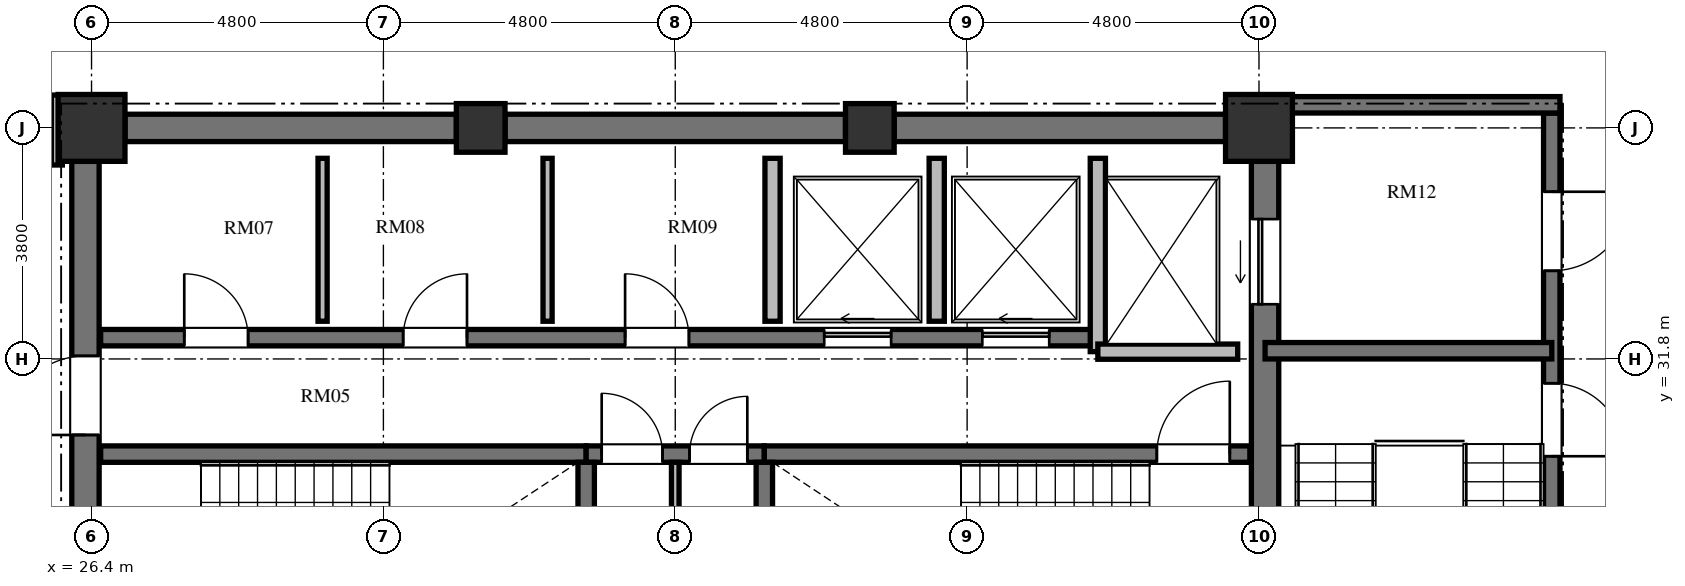
"""IFC4 building model, lengths in metres.
Left out: names, types, materials, properties, quantities, classifications, styles, units other than length and angle.
Written with IfcOpenShell. Run it as: python <this file> out.ifc"""

import sys

from ifc_helpers import new_model, si_unit, direction, frame, frame_2d, origin, origin_2d, place, context, subcontext, project, spatial, rectangle, extrude, element, fill, save


model = new_model("IFC4")
c1 = context("Model", 3, precision=1e-05, world=origin(), true_north=direction((0.0, 1.0)))
c2 = subcontext(c1, "Body", "Model", "MODEL_VIEW")
j1 = project(units=[si_unit("LENGTHUNIT", "METRE"), si_unit("PLANEANGLEUNIT", "RADIAN")], contexts=[c1])
p1 = place(None, origin())
s1 = spatial("IfcSite", under=j1, at=p1, CompositionType="ELEMENT")
p2 = place(p1, origin())
s2 = spatial("IfcBuilding", under=s1, at=p2, CompositionType="ELEMENT")
p3 = place(p2, frame((0.0, 0.0, 258.672)))
s3 = spatial("IfcBuildingStorey", under=s2, at=p3, CompositionType="ELEMENT", Elevation=258.672)
p4 = place(p3, frame((45.6, 35.6, 0.0), z_axis=(0.0, 0.0, 1.0), x_axis=(1.0, 0.0, 0.0)))
e1 = element("IfcColumn", 1, at=p4, inside=s3, PredefinedType="COLUMN", context=c2, shape_type="SweptSolid", body=[
    extrude(rectangle(XDim=1.1, YDim=1.1, at=origin_2d()), origin(), (0.0, 0.0, 1.0), 3.648),
])
for number, where, z_axis, x_axis in (
    (2, (39.2, 35.6, 0.0), (0.0, 0.0, 1.0), (1.0, 0.0, 0.0)),
    (3, (32.8, 35.6, 0.0), (0.0, 0.0, 1.0), (1.0, 0.0, 0.0)),
):
    element("IfcColumn", number, at=place(p3, frame(where, z_axis=z_axis, x_axis=x_axis)), inside=s3, PredefinedType="COLUMN", context=c2, shape_type="SweptSolid", body=[
        extrude(rectangle(XDim=0.8, YDim=0.8, at=origin_2d()), origin(), (0.0, 0.0, 1.0), 3.648),
    ])
p5 = place(p3, frame((26.4, 35.6, 0.0), z_axis=(0.0, 0.0, 1.0), x_axis=(1.0, 0.0, 0.0)))
e4 = element("IfcColumn", 4, at=p5, inside=s3, PredefinedType="COLUMN", context=c2, shape_type="SweptSolid", body=[
    extrude(rectangle(XDim=1.1, YDim=1.1, at=origin_2d()), origin(), (0.0, 0.0, 1.0), 3.648),
])
p6 = place(p3, frame((26.3, 20.95, 0.0), z_axis=(0.0, 0.0, 1.0), x_axis=(0.0, 1.0, 0.0)))
e5 = element("IfcWall", 5, at=p6, inside=s3, PredefinedType="SHEAR", context=c2, shape_type="SweptSolid", body=[
    extrude(rectangle(XDim=14.1, YDim=0.45, at=frame_2d((7.05, 0.0))), origin(), (0.0, 0.0, 1.0), 3.648),
])
p7 = place(p6, frame((6.5, 0.0, 0.0)))
e6 = element("IfcOpeningElement", 6, at=p7, cuts=e5, PredefinedType="OPENING", context=c2, shape_type="SweptSolid", body=[
    extrude(rectangle(XDim=1.2, YDim=2.15, at=frame_2d((0.6, 1.075))), frame((0.0, 0.235, 0.0), z_axis=(0.0, -1.0, 0.0), x_axis=(1.0, 0.0, 0.0)), (0.0, 0.0, 1.0), 0.47),
])
p8 = place(p6, frame((9.6, 0.0, 0.0)))
e7 = element("IfcOpeningElement", 7, at=p8, cuts=e5, PredefinedType="OPENING", context=c2, shape_type="SweptSolid", body=[
    extrude(rectangle(XDim=1.3, YDim=2.2, at=frame_2d((0.65, 1.1))), frame((0.0, 0.235, 0.0), z_axis=(0.0, -1.0, 0.0), x_axis=(1.0, 0.0, 0.0)), (0.0, 0.0, 1.0), 0.47),
])
p9 = place(p6, frame((3.26, 0.0, 0.0)))
e8 = element("IfcOpeningElement", 8, at=p9, cuts=e5, PredefinedType="OPENING", context=c2, shape_type="SweptSolid", body=[
    extrude(rectangle(XDim=1.3, YDim=2.2, at=frame_2d((0.65, 1.1))), frame((0.0, 0.235, 0.0), z_axis=(0.0, -1.0, 0.0), x_axis=(1.0, 0.0, 0.0)), (0.0, 0.0, 1.0), 0.47),
])
p10 = place(p3, frame((45.7, 20.95, 0.0), z_axis=(0.0, 0.0, 1.0), x_axis=(0.0, 1.0, 0.0)))
e9 = element("IfcWall", 9, at=p10, inside=s3, PredefinedType="SHEAR", context=c2, shape_type="SweptSolid", body=[
    extrude(rectangle(XDim=14.1, YDim=0.45, at=frame_2d((7.05, 0.0))), origin(), (0.0, 0.0, 1.0), 3.648),
])
p11 = place(p10, frame((11.75, 0.0, 0.0)))
e10 = element("IfcOpeningElement", 10, at=p11, cuts=e9, PredefinedType="OPENING", context=c2, shape_type="SweptSolid", body=[
    extrude(rectangle(XDim=1.4, YDim=2.3, at=frame_2d((0.7, 1.15))), frame((0.0, 0.235, 0.0), z_axis=(0.0, -1.0, 0.0), x_axis=(1.0, 0.0, 0.0)), (0.0, 0.0, 1.0), 0.47),
])
p12 = place(p10, frame((0.95, 0.0, 0.0)))
e11 = element("IfcOpeningElement", 11, at=p12, cuts=e9, PredefinedType="OPENING", context=c2, shape_type="SweptSolid", body=[
    extrude(rectangle(XDim=1.4, YDim=2.3, at=frame_2d((0.7, 1.15))), frame((0.0, 0.235, 0.0), z_axis=(0.0, -1.0, 0.0), x_axis=(1.0, 0.0, 0.0)), (0.0, 0.0, 1.0), 0.47),
])
p13 = place(p3, frame((26.95, 35.6, 0.0), z_axis=(0.0, 0.0, 1.0), x_axis=(1.0, 0.0, 0.0)))
e12 = element("IfcWall", 12, at=p13, inside=s3, PredefinedType="SHEAR", context=c2, shape_type="SweptSolid", body=[
    extrude(rectangle(XDim=5.45, YDim=0.45, at=frame_2d((2.725, 0.0))), origin(), (0.0, 0.0, 1.0), 3.648),
])
p14 = place(p3, frame((33.2, 35.6, 0.0), z_axis=(0.0, 0.0, 1.0), x_axis=(1.0, 0.0, 0.0)))
e13 = element("IfcWall", 13, at=p14, inside=s3, PredefinedType="SHEAR", context=c2, shape_type="SweptSolid", body=[
    extrude(rectangle(XDim=5.6, YDim=0.45, at=frame_2d((2.8, 0.0))), origin(), (0.0, 0.0, 1.0), 3.648),
])
p15 = place(p3, frame((39.6, 35.6, 0.0), z_axis=(0.0, 0.0, 1.0), x_axis=(1.0, 0.0, 0.0)))
e14 = element("IfcWall", 14, at=p15, inside=s3, PredefinedType="SHEAR", context=c2, shape_type="SweptSolid", body=[
    extrude(rectangle(XDim=5.45, YDim=0.45, at=frame_2d((2.725, 0.0))), origin(), (0.0, 0.0, 1.0), 3.648),
])
p16 = place(p3, frame((26.55, 30.235, 0.0), z_axis=(0.0, 0.0, 1.0), x_axis=(1.0, 0.0, 0.0)))
e15 = element("IfcWall", 15, at=p16, inside=s3, PredefinedType="SHEAR", context=c2, shape_type="SweptSolid", body=[
    extrude(rectangle(XDim=7.985, YDim=0.27, at=frame_2d((3.992, 0.0))), origin(), (0.0, 0.0, 1.0), 3.648),
])
p17 = place(p3, frame((34.535, 30.235, 0.0), z_axis=(0.0, 0.0, 1.0), x_axis=(1.0, 0.0, 0.0)))
e16 = element("IfcWall", 16, at=p17, inside=s3, PredefinedType="SHEAR", context=c2, shape_type="SweptSolid", body=[
    extrude(rectangle(XDim=2.93, YDim=0.27, at=frame_2d((1.465, 0.0))), origin(), (0.0, 0.0, 1.0), 3.648),
])
p18 = place(p17, frame((0.255, 0.0, 0.0)))
e17 = element("IfcOpeningElement", 17, at=p18, cuts=e16, PredefinedType="OPENING", context=c2, shape_type="SweptSolid", body=[
    extrude(rectangle(XDim=1.0, YDim=2.1, at=frame_2d((0.5, 1.05))), frame((0.0, 0.145, 0.0), z_axis=(0.0, -1.0, 0.0), x_axis=(1.0, 0.0, 0.0)), (0.0, 0.0, 1.0), 0.29),
])
p19 = place(p17, frame((1.7, 0.0, 0.0)))
e18 = element("IfcOpeningElement", 18, at=p19, cuts=e16, PredefinedType="OPENING", context=c2, shape_type="SweptSolid", body=[
    extrude(rectangle(XDim=0.95, YDim=2.1, at=frame_2d((0.475, 1.05))), frame((0.0, 0.145, 0.0), z_axis=(0.0, -1.0, 0.0), x_axis=(1.0, 0.0, 0.0)), (0.0, 0.0, 1.0), 0.29),
])
p20 = place(p3, frame((37.465, 30.235, 0.0), z_axis=(0.0, 0.0, 1.0), x_axis=(1.0, 0.0, 0.0)))
e19 = element("IfcWall", 19, at=p20, inside=s3, PredefinedType="SHEAR", context=c2, shape_type="SweptSolid", body=[
    extrude(rectangle(XDim=7.985, YDim=0.27, at=frame_2d((3.992, 0.0))), origin(), (0.0, 0.0, 1.0), 3.648),
])
p21 = place(p20, frame((6.455, 0.0, 0.0)))
e20 = element("IfcOpeningElement", 20, at=p21, cuts=e19, PredefinedType="OPENING", context=c2, shape_type="SweptSolid", body=[
    extrude(rectangle(XDim=1.2, YDim=2.15, at=frame_2d((0.6, 1.075))), frame((0.0, 0.145, 0.0), z_axis=(0.0, -1.0, 0.0), x_axis=(1.0, 0.0, 0.0)), (0.0, 0.0, 1.0), 0.29),
])
for number, where, z_axis, x_axis in (
    (21, (34.535, 26.02, 0.0), (0.0, 0.0, 1.0), (0.0, 1.0, 0.0)),
    (22, (37.465, 26.02, 0.0), (0.0, 0.0, 1.0), (0.0, 1.0, 0.0)),
):
    element("IfcWall", number, at=place(p3, frame(where, z_axis=z_axis, x_axis=x_axis)), inside=s3, PredefinedType="SHEAR", context=c2, shape_type="SweptSolid", body=[
        extrude(rectangle(XDim=4.08, YDim=0.27, at=frame_2d((2.04, 0.0))), origin(), (0.0, 0.0, 1.0), 3.648),
    ])
p22 = place(p3, frame((36.0, 26.02, 0.0), z_axis=(0.0, 0.0, 1.0), x_axis=(0.0, 1.0, 0.0)))
e23 = element("IfcWall", 23, at=p22, inside=s3, PredefinedType="PARTITIONING", context=c2, shape_type="SweptSolid", body=[
    extrude(rectangle(XDim=4.08, YDim=0.125, at=frame_2d((2.04, 0.0))), origin(), (0.0, 0.0, 1.0), 3.448),
])
p23 = place(p3, frame((26.55, 32.15, 0.0), z_axis=(0.0, 0.0, 1.0), x_axis=(1.0, 0.0, 0.0)))
e24 = element("IfcWall", 24, at=p23, inside=s3, PredefinedType="SHEAR", context=c2, shape_type="SweptSolid", body=[
    extrude(rectangle(XDim=16.4, YDim=0.27, at=frame_2d((8.2, 0.0))), origin(), (0.0, 0.0, 1.0), 3.648),
])
p24 = place(p23, frame((1.375, 0.0, 0.0)))
e25 = element("IfcOpeningElement", 25, at=p24, cuts=e24, PredefinedType="OPENING", context=c2, shape_type="SweptSolid", body=[
    extrude(rectangle(XDim=1.05, YDim=2.15, at=frame_2d((0.525, 1.075))), frame((0.0, 0.145, 0.0), z_axis=(0.0, -1.0, 0.0), x_axis=(1.0, 0.0, 0.0)), (0.0, 0.0, 1.0), 0.29),
])
p25 = place(p23, frame((4.975, 0.0, 0.0)))
e26 = element("IfcOpeningElement", 26, at=p25, cuts=e24, PredefinedType="OPENING", context=c2, shape_type="SweptSolid", body=[
    extrude(rectangle(XDim=1.05, YDim=2.15, at=frame_2d((0.525, 1.075))), frame((0.0, 0.145, 0.0), z_axis=(0.0, -1.0, 0.0), x_axis=(1.0, 0.0, 0.0)), (0.0, 0.0, 1.0), 0.29),
])
p26 = place(p23, frame((8.625, 0.0, 0.0)))
e27 = element("IfcOpeningElement", 27, at=p26, cuts=e24, PredefinedType="OPENING", context=c2, shape_type="SweptSolid", body=[
    extrude(rectangle(XDim=1.05, YDim=2.15, at=frame_2d((0.525, 1.075))), frame((0.0, 0.145, 0.0), z_axis=(0.0, -1.0, 0.0), x_axis=(1.0, 0.0, 0.0)), (0.0, 0.0, 1.0), 0.29),
])
p27 = place(p23, frame((11.9, 0.0, 0.0)))
e28 = element("IfcOpeningElement", 28, at=p27, cuts=e24, PredefinedType="OPENING", context=c2, shape_type="SweptSolid", body=[
    extrude(rectangle(XDim=1.1, YDim=2.2, at=frame_2d((0.55, 1.1))), frame((0.0, 0.145, 0.0), z_axis=(0.0, -1.0, 0.0), x_axis=(1.0, 0.0, 0.0)), (0.0, 0.0, 1.0), 0.29),
])
p28 = place(p23, frame((14.5, 0.0, 0.0)))
e29 = element("IfcOpeningElement", 29, at=p28, cuts=e24, PredefinedType="OPENING", context=c2, shape_type="SweptSolid", body=[
    extrude(rectangle(XDim=1.1, YDim=2.2, at=frame_2d((0.55, 1.1))), frame((0.0, 0.145, 0.0), z_axis=(0.0, -1.0, 0.0), x_axis=(1.0, 0.0, 0.0)), (0.0, 0.0, 1.0), 0.29),
])
p29 = place(p3, frame((42.95, 31.92, 0.0), z_axis=(0.0, 0.0, 1.0), x_axis=(0.0, 1.0, 0.0)))
e30 = element("IfcWall", 30, at=p29, inside=s3, PredefinedType="SOLIDWALL", context=c2, shape_type="SweptSolid", body=[
    extrude(rectangle(XDim=3.18, YDim=0.25, at=frame_2d((1.59, 0.0))), origin(), (0.0, 0.0, 1.0), 3.448),
])
p30 = place(p3, frame((42.95, 31.92, 0.0), z_axis=(0.0, 0.0, 1.0), x_axis=(1.0, 0.0, 0.0)))
e31 = element("IfcWall", 31, at=p30, inside=s3, PredefinedType="SOLIDWALL", context=c2, shape_type="SweptSolid", body=[
    extrude(rectangle(XDim=2.3, YDim=0.25, at=frame_2d((1.15, 0.0))), origin(), (0.0, 0.0, 1.0), 3.448),
])
for number, where, z_axis, x_axis in (
    (32, (37.6, 32.42, 0.0), (0.0, 0.0, 1.0), (0.0, 1.0, 0.0)),
    (33, (40.3, 32.42, 0.0), (0.0, 0.0, 1.0), (0.0, 1.0, 0.0)),
):
    element("IfcWall", number, at=place(p3, frame(where, z_axis=z_axis, x_axis=x_axis)), inside=s3, PredefinedType="SOLIDWALL", context=c2, shape_type="SweptSolid", body=[
        extrude(rectangle(XDim=2.68, YDim=0.25, at=frame_2d((1.34, 0.0))), origin(), (0.0, 0.0, 1.0), 3.448),
    ])
for number, where, z_axis, x_axis in (
    (34, (30.2, 32.42, 0.0), (0.0, 0.0, 1.0), (0.0, 1.0, 0.0)),
    (35, (33.9, 32.42, 0.0), (0.0, 0.0, 1.0), (0.0, 1.0, 0.0)),
):
    element("IfcWall", number, at=place(p3, frame(where, z_axis=z_axis, x_axis=x_axis)), inside=s3, PredefinedType="PARTITIONING", context=c2, shape_type="SweptSolid", body=[
        extrude(rectangle(XDim=2.68, YDim=0.15, at=frame_2d((1.34, 0.0))), origin(), (0.0, 0.0, 1.0), 3.448),
    ])
p31 = place(p3, frame((50.415, 35.845, 0.0), z_axis=(0.0, 0.0, 1.0), x_axis=(0.0, -1.0, 0.0)))
e36 = element("IfcWall", 36, at=p31, inside=s3, PredefinedType="SHEAR", context=c2, shape_type="SweptSolid", body=[
    extrude(rectangle(XDim=15.825, YDim=0.27, at=frame_2d((7.913, 0.0))), origin(), (0.0, 0.0, 1.0), 3.648),
])
p32 = place(p31, frame((4.445, 0.0, 0.0)))
e37 = element("IfcOpeningElement", 37, at=p32, cuts=e36, PredefinedType="OPENING", context=c2, shape_type="SweptSolid", body=[
    extrude(rectangle(XDim=1.2, YDim=2.15, at=frame_2d((0.6, 1.075))), frame((0.0, 0.145, 0.0), z_axis=(0.0, -1.0, 0.0), x_axis=(1.0, 0.0, 0.0)), (0.0, 0.0, 1.0), 0.29),
])
p33 = place(p31, frame((1.295, 0.0, 0.0)))
e38 = element("IfcOpeningElement", 38, at=p33, cuts=e36, PredefinedType="OPENING", context=c2, shape_type="SweptSolid", body=[
    extrude(rectangle(XDim=1.3, YDim=2.2, at=frame_2d((0.65, 1.1))), frame((0.0, 0.145, 0.0), z_axis=(0.0, -1.0, 0.0), x_axis=(1.0, 0.0, 0.0)), (0.0, 0.0, 1.0), 0.29),
])
p34 = place(p31, frame((13.095, 0.0, 0.0)))
e39 = element("IfcOpeningElement", 39, at=p34, cuts=e36, PredefinedType="OPENING", context=c2, shape_type="SweptSolid", body=[
    extrude(rectangle(XDim=1.3, YDim=2.2, at=frame_2d((0.65, 1.1))), frame((0.0, 0.145, 0.0), z_axis=(0.0, -1.0, 0.0), x_axis=(1.0, 0.0, 0.0)), (0.0, 0.0, 1.0), 0.29),
])
p35 = place(p3, frame((45.925, 35.98, 0.0), z_axis=(0.0, 0.0, 1.0), x_axis=(1.0, 0.0, 0.0)))
e40 = element("IfcWall", 40, at=p35, inside=s3, PredefinedType="SHEAR", context=c2, shape_type="SweptSolid", body=[
    extrude(rectangle(XDim=4.625, YDim=0.27, at=frame_2d((2.312, 0.0))), origin(), (0.0, 0.0, 1.0), 3.648),
])
p36 = place(p3, frame((45.7, 31.935, 0.0), z_axis=(0.0, 0.0, 1.0), x_axis=(1.0, 0.0, 0.0)))
e41 = element("IfcWall", 41, at=p36, inside=s3, PredefinedType="SHEAR", context=c2, shape_type="SweptSolid", body=[
    extrude(rectangle(XDim=4.715, YDim=0.27, at=frame_2d((2.357, 0.0))), origin(), (0.0, 0.0, 1.0), 3.648),
])
p37 = place(p3, frame((23.294, 36.422, 0.0), z_axis=(0.0, 0.0, 1.0), x_axis=(0.945493277461, 0.325641616316, 0.0)))
e42 = element("IfcWall", 42, at=p37, inside=s3, PredefinedType="PARTITIONING", context=c2, shape_type="SweptSolid", body=[
    extrude(rectangle(XDim=5.562, YDim=0.18, at=frame_2d((2.781, 0.0))), origin(), (0.0, 0.0, 1.0), 3.073),
])
p38 = place(p3, frame((25.83, 36.14, 0.0), z_axis=(0.0, 0.0, 1.0), x_axis=(0.0, -1.0, 0.0)))
e43 = element("IfcWall", 43, at=p38, inside=s3, PredefinedType="PARTITIONING", context=c2, shape_type="SweptSolid", body=[
    extrude(rectangle(XDim=1.15, YDim=0.18, at=frame_2d((0.575, 0.0))), origin(), (0.0, 0.0, 1.0), 3.448),
])
p39 = place(p21, origin())
e44 = element("IfcDoor", 44, at=p39, inside=s3, OperationType="SINGLE_SWING_RIGHT", PredefinedType="DOOR", context=c2, shape_type="SweptSolid", body=[
    extrude(rectangle(XDim=1.2, YDim=2.15, at=frame_2d((0.6, 1.075))), frame((0.0, 0.025, 0.0), z_axis=(0.0, -1.0, 0.0), x_axis=(1.0, 0.0, 0.0)), (0.0, 0.0, 1.0), 0.05),
])
fill(e20, e44)
p40 = place(p18, origin())
e45 = element("IfcDoor", 45, at=p40, inside=s3, OperationType="SINGLE_SWING_LEFT", PredefinedType="DOOR", context=c2, shape_type="SweptSolid", body=[
    extrude(rectangle(XDim=1.0, YDim=2.1, at=frame_2d((0.5, 1.05))), frame((0.0, 0.025, 0.0), z_axis=(0.0, -1.0, 0.0), x_axis=(1.0, 0.0, 0.0)), (0.0, 0.0, 1.0), 0.05),
])
fill(e17, e45)
p41 = place(p19, origin())
e46 = element("IfcDoor", 46, at=p41, inside=s3, OperationType="SINGLE_SWING_RIGHT", PredefinedType="DOOR", context=c2, shape_type="SweptSolid", body=[
    extrude(rectangle(XDim=0.95, YDim=2.1, at=frame_2d((0.475, 1.05))), frame((0.0, 0.025, 0.0), z_axis=(0.0, -1.0, 0.0), x_axis=(1.0, 0.0, 0.0)), (0.0, 0.0, 1.0), 0.05),
])
fill(e18, e46)
p42 = place(p8, origin())
e47 = element("IfcDoor", 47, at=p42, inside=s3, OperationType="SINGLE_SWING_LEFT", PredefinedType="DOOR", context=c2, shape_type="SweptSolid", body=[
    extrude(rectangle(XDim=1.3, YDim=2.2, at=frame_2d((0.65, 1.1))), frame((0.0, 0.025, 0.0), z_axis=(0.0, -1.0, 0.0), x_axis=(1.0, 0.0, 0.0)), (0.0, 0.0, 1.0), 0.05),
])
fill(e7, e47)
p43 = place(p24, origin())
e48 = element("IfcDoor", 48, at=p43, inside=s3, OperationType="SINGLE_SWING_LEFT", PredefinedType="DOOR", context=c2, shape_type="SweptSolid", body=[
    extrude(rectangle(XDim=1.05, YDim=2.15, at=frame_2d((0.525, 1.075))), frame((0.0, 0.025, 0.0), z_axis=(0.0, -1.0, 0.0), x_axis=(1.0, 0.0, 0.0)), (0.0, 0.0, 1.0), 0.05),
])
fill(e25, e48)
p44 = place(p25, origin())
e49 = element("IfcDoor", 49, at=p44, inside=s3, OperationType="SINGLE_SWING_RIGHT", PredefinedType="DOOR", context=c2, shape_type="SweptSolid", body=[
    extrude(rectangle(XDim=1.05, YDim=2.15, at=frame_2d((0.525, 1.075))), frame((0.0, 0.025, 0.0), z_axis=(0.0, -1.0, 0.0), x_axis=(1.0, 0.0, 0.0)), (0.0, 0.0, 1.0), 0.05),
])
fill(e26, e49)
p45 = place(p26, origin())
e50 = element("IfcDoor", 50, at=p45, inside=s3, OperationType="SINGLE_SWING_LEFT", PredefinedType="DOOR", context=c2, shape_type="SweptSolid", body=[
    extrude(rectangle(XDim=1.05, YDim=2.15, at=frame_2d((0.525, 1.075))), frame((0.0, 0.025, 0.0), z_axis=(0.0, -1.0, 0.0), x_axis=(1.0, 0.0, 0.0)), (0.0, 0.0, 1.0), 0.05),
])
fill(e27, e50)
p46 = place(p27, origin())
e51 = element("IfcDoor", 51, at=p46, inside=s3, OperationType="SLIDING_TO_LEFT", PredefinedType="DOOR", context=c2, shape_type="SweptSolid", body=[
    extrude(rectangle(XDim=1.1, YDim=2.2, at=frame_2d((0.55, 1.1))), frame((0.0, 0.025, 0.0), z_axis=(0.0, -1.0, 0.0), x_axis=(1.0, 0.0, 0.0)), (0.0, 0.0, 1.0), 0.05),
])
fill(e28, e51)
p47 = place(p28, origin())
e52 = element("IfcDoor", 52, at=p47, inside=s3, OperationType="SLIDING_TO_LEFT", PredefinedType="DOOR", context=c2, shape_type="SweptSolid", body=[
    extrude(rectangle(XDim=1.1, YDim=2.2, at=frame_2d((0.55, 1.1))), frame((0.0, 0.025, 0.0), z_axis=(0.0, -1.0, 0.0), x_axis=(1.0, 0.0, 0.0)), (0.0, 0.0, 1.0), 0.05),
])
fill(e29, e52)
p48 = place(p11, origin())
e53 = element("IfcDoor", 53, at=p48, inside=s3, OperationType="SLIDING_TO_LEFT", PredefinedType="DOOR", context=c2, shape_type="SweptSolid", body=[
    extrude(rectangle(XDim=1.4, YDim=2.3, at=frame_2d((0.7, 1.15))), frame((0.0, 0.025, 0.0), z_axis=(0.0, -1.0, 0.0), x_axis=(1.0, 0.0, 0.0)), (0.0, 0.0, 1.0), 0.05),
])
fill(e10, e53)
p49 = place(p32, origin())
e54 = element("IfcDoor", 54, at=p49, inside=s3, OperationType="SINGLE_SWING_RIGHT", PredefinedType="DOOR", context=c2, shape_type="SweptSolid", body=[
    extrude(rectangle(XDim=1.2, YDim=2.15, at=frame_2d((0.6, 1.075))), frame((0.0, 0.025, 0.0), z_axis=(0.0, -1.0, 0.0), x_axis=(1.0, 0.0, 0.0)), (0.0, 0.0, 1.0), 0.05),
])
fill(e37, e54)
p50 = place(p33, origin())
e55 = element("IfcDoor", 55, at=p50, inside=s3, OperationType="SINGLE_SWING_LEFT", PredefinedType="DOOR", context=c2, shape_type="SweptSolid", body=[
    extrude(rectangle(XDim=1.3, YDim=2.2, at=frame_2d((0.65, 1.1))), frame((0.0, 0.025, 0.0), z_axis=(0.0, -1.0, 0.0), x_axis=(1.0, 0.0, 0.0)), (0.0, 0.0, 1.0), 0.05),
])
fill(e38, e55)
save(model, sys.argv[1])
